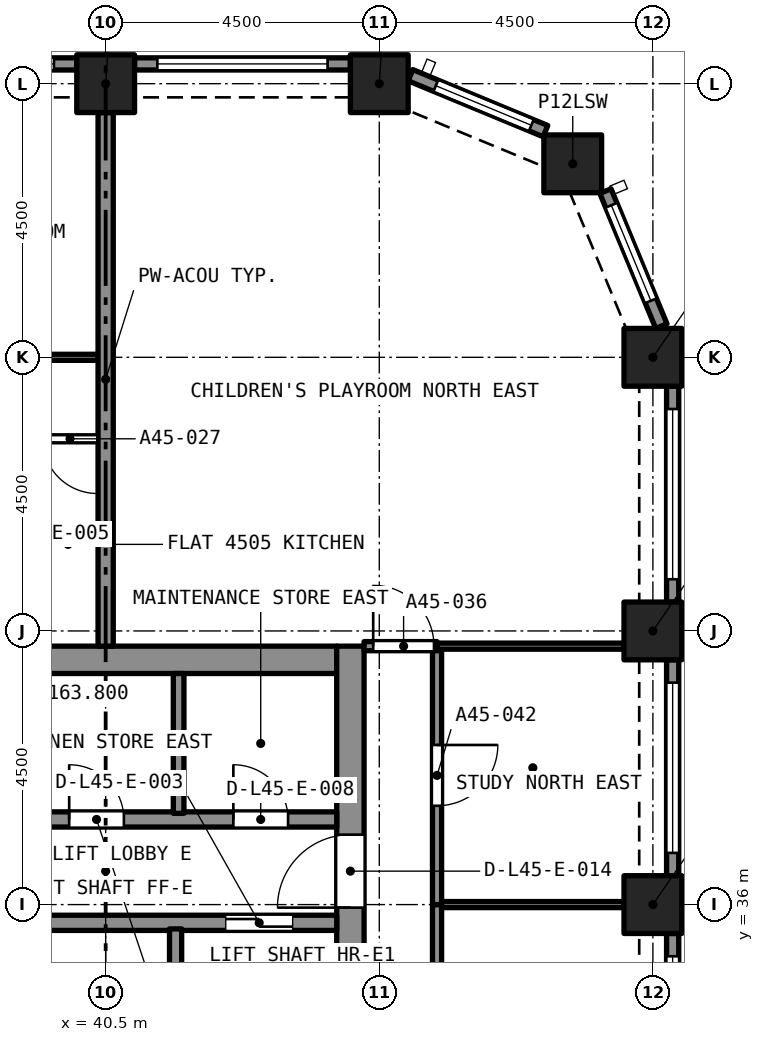
"""IFC4 building model, lengths in metres.
Left out: names, types, materials, properties, quantities, classifications, styles, units other than length and angle.
Written with IfcOpenShell. Run it as: python <this file> out.ifc"""

import sys

from ifc_helpers import new_model, si_unit, direction, frame, frame_2d, origin, origin_2d, place, context, subcontext, project, spatial, rectangle, extrude, element, fill, save


model = new_model("IFC4")
c1 = context("Model", 3, precision=1e-05, world=origin(), true_north=direction((0.0, 1.0)))
c2 = subcontext(c1, "Body", "Model", "MODEL_VIEW")
j1 = project(units=[si_unit("LENGTHUNIT", "METRE"), si_unit("PLANEANGLEUNIT", "RADIAN")], contexts=[c1])
p1 = place(None, origin())
s1 = spatial("IfcSite", under=j1, at=p1, CompositionType="ELEMENT")
p2 = place(p1, origin())
s2 = spatial("IfcBuilding", under=s1, at=p2, CompositionType="ELEMENT")
p3 = place(p2, frame((0.0, 0.0, 163.8)))
s3 = spatial("IfcBuildingStorey", under=s2, at=p3, CompositionType="ELEMENT", Elevation=163.8)
for number, where, z_axis, x_axis in (
    (1, (49.5, 36.0, 0.0), (0.0, 0.0, 1.0), (1.0, 0.0, 0.0)),
    (2, (49.5, 40.5, 0.0), (0.0, 0.0, 1.0), (1.0, 0.0, 0.0)),
    (3, (49.5, 45.0, 0.0), (0.0, 0.0, 1.0), (1.0, 0.0, 0.0)),
    (4, (48.182, 48.182, 0.0), (0.0, 0.0, 1.0), (1.0, 0.0, 0.0)),
    (5, (40.5, 49.5, 0.0), (0.0, 0.0, 1.0), (1.0, 0.0, 0.0)),
    (6, (45.0, 49.5, 0.0), (0.0, 0.0, 1.0), (1.0, 0.0, 0.0)),
):
    element("IfcColumn", number, at=place(p3, frame(where, z_axis=z_axis, x_axis=x_axis)), inside=s3, PredefinedType="COLUMN", context=c2, shape_type="SweptSolid", body=[
        extrude(rectangle(XDim=0.95, YDim=0.95, at=origin_2d()), origin(), (0.0, 0.0, 1.0), 4.4),
    ])
p4 = place(p3, frame((36.7, 40.025, 0.0), z_axis=(0.0, 0.0, 1.0), x_axis=(1.0, 0.0, 0.0)))
e7 = element("IfcWall", 7, at=p4, inside=s3, PredefinedType="SOLIDWALL", context=c2, shape_type="SweptSolid", body=[
    extrude(rectangle(XDim=7.6, YDim=0.45, at=frame_2d((3.8, 0.0))), origin(), (0.0, 0.0, 1.0), 4.4),
])
p5 = place(p3, frame((44.525, 27.25, 0.0), z_axis=(0.0, 0.0, 1.0), x_axis=(0.0, 1.0, 0.0)))
e8 = element("IfcWall", 8, at=p5, inside=s3, PredefinedType="SOLIDWALL", context=c2, shape_type="SweptSolid", body=[
    extrude(rectangle(XDim=13.0, YDim=0.45, at=frame_2d((6.5, 0.0))), origin(), (0.0, 0.0, 1.0), 4.4),
])
p6 = place(p5, frame((8.7, 0.0, 0.0)))
e9 = element("IfcOpeningElement", 9, at=p6, cuts=e8, PredefinedType="OPENING", context=c2, shape_type="SweptSolid", body=[
    extrude(rectangle(XDim=1.2, YDim=2.1, at=frame_2d((0.6, 1.05))), frame((0.0, 0.235, 0.0), z_axis=(0.0, -1.0, 0.0), x_axis=(1.0, 0.0, 0.0)), (0.0, 0.0, 1.0), 0.47),
])
p7 = place(p3, frame((49.825, 35.525, 0.0), z_axis=(0.0, 0.0, 1.0), x_axis=(0.0, -1.0, 0.0)))
e10 = element("IfcWall", 10, at=p7, inside=s3, PredefinedType="SOLIDWALL", context=c2, shape_type="SweptSolid", body=[
    extrude(rectangle(XDim=3.55, YDim=0.2, at=frame_2d((1.775, 0.0))), origin(), (0.0, 0.0, 1.0), 4.4),
])
p8 = place(p7, frame((0.375, 0.0, 0.45)))
e11 = element("IfcOpeningElement", 11, at=p8, cuts=e10, PredefinedType="OPENING", context=c2, shape_type="SweptSolid", body=[
    extrude(rectangle(XDim=2.8, YDim=2.55, at=frame_2d((1.4, 1.275))), frame((0.0, 0.11, 0.0), z_axis=(0.0, -1.0, 0.0), x_axis=(1.0, 0.0, 0.0)), (0.0, 0.0, 1.0), 0.22),
])
p9 = place(p3, frame((49.825, 40.025, 0.0), z_axis=(0.0, 0.0, 1.0), x_axis=(0.0, -1.0, 0.0)))
e12 = element("IfcWall", 12, at=p9, inside=s3, PredefinedType="SOLIDWALL", context=c2, shape_type="SweptSolid", body=[
    extrude(rectangle(XDim=3.55, YDim=0.2, at=frame_2d((1.775, 0.0))), origin(), (0.0, 0.0, 1.0), 4.4),
])
p10 = place(p9, frame((0.375, 0.0, 0.45)))
e13 = element("IfcOpeningElement", 13, at=p10, cuts=e12, PredefinedType="OPENING", context=c2, shape_type="SweptSolid", body=[
    extrude(rectangle(XDim=2.8, YDim=2.55, at=frame_2d((1.4, 1.275))), frame((0.0, 0.11, 0.0), z_axis=(0.0, -1.0, 0.0), x_axis=(1.0, 0.0, 0.0)), (0.0, 0.0, 1.0), 0.22),
])
p11 = place(p3, frame((49.825, 44.525, 0.0), z_axis=(0.0, 0.0, 1.0), x_axis=(0.0, -1.0, 0.0)))
e14 = element("IfcWall", 14, at=p11, inside=s3, PredefinedType="SOLIDWALL", context=c2, shape_type="SweptSolid", body=[
    extrude(rectangle(XDim=3.55, YDim=0.2, at=frame_2d((1.775, 0.0))), origin(), (0.0, 0.0, 1.0), 4.4),
])
p12 = place(p11, frame((0.375, 0.0, 0.45)))
e15 = element("IfcOpeningElement", 15, at=p12, cuts=e14, PredefinedType="OPENING", context=c2, shape_type="SweptSolid", body=[
    extrude(rectangle(XDim=2.8, YDim=2.55, at=frame_2d((1.4, 1.275))), frame((0.0, 0.11, 0.0), z_axis=(0.0, -1.0, 0.0), x_axis=(1.0, 0.0, 0.0)), (0.0, 0.0, 1.0), 0.22),
])
p13 = place(p3, frame((48.72, 47.733, 0.0), z_axis=(0.0, 0.0, 1.0), x_axis=(0.382680855588, -0.923880599843, 0.0)))
e16 = element("IfcWall", 16, at=p13, inside=s3, PredefinedType="SOLIDWALL", context=c2, shape_type="SweptSolid", body=[
    extrude(rectangle(XDim=2.403, YDim=0.2, at=frame_2d((1.201, 0.0))), origin(), (0.0, 0.0, 1.0), 4.4),
])
p14 = place(p13, frame((0.251, 0.0, 0.45)))
e17 = element("IfcOpeningElement", 17, at=p14, cuts=e16, PredefinedType="OPENING", context=c2, shape_type="SweptSolid", body=[
    extrude(rectangle(XDim=1.7, YDim=2.55, at=frame_2d((0.85, 1.275))), frame((0.0, 0.11, 0.0), z_axis=(0.0, -1.0, 0.0), x_axis=(1.0, 0.0, 0.0)), (0.0, 0.0, 1.0), 0.22),
])
p15 = place(p3, frame((45.513, 49.639, 0.0), z_axis=(0.0, 0.0, 1.0), x_axis=(0.923880599843, -0.382680855588, 0.0)))
e18 = element("IfcWall", 18, at=p15, inside=s3, PredefinedType="SOLIDWALL", context=c2, shape_type="SweptSolid", body=[
    extrude(rectangle(XDim=2.403, YDim=0.2, at=frame_2d((1.201, 0.0))), origin(), (0.0, 0.0, 1.0), 4.4),
])
p16 = place(p15, frame((0.451, 0.0, 0.45)))
e19 = element("IfcOpeningElement", 19, at=p16, cuts=e18, PredefinedType="OPENING", context=c2, shape_type="SweptSolid", body=[
    extrude(rectangle(XDim=1.7, YDim=2.55, at=frame_2d((0.85, 1.275))), frame((0.0, 0.11, 0.0), z_axis=(0.0, -1.0, 0.0), x_axis=(1.0, 0.0, 0.0)), (0.0, 0.0, 1.0), 0.22),
])
p17 = place(p3, frame((40.975, 49.825, 0.0), z_axis=(0.0, 0.0, 1.0), x_axis=(1.0, 0.0, 0.0)))
e20 = element("IfcWall", 20, at=p17, inside=s3, PredefinedType="SOLIDWALL", context=c2, shape_type="SweptSolid", body=[
    extrude(rectangle(XDim=3.55, YDim=0.2, at=frame_2d((1.775, 0.0))), origin(), (0.0, 0.0, 1.0), 4.4),
])
p18 = place(p17, frame((0.375, 0.0, 0.45)))
e21 = element("IfcOpeningElement", 21, at=p18, cuts=e20, PredefinedType="OPENING", context=c2, shape_type="SweptSolid", body=[
    extrude(rectangle(XDim=2.8, YDim=2.55, at=frame_2d((1.4, 1.275))), frame((0.0, 0.11, 0.0), z_axis=(0.0, -1.0, 0.0), x_axis=(1.0, 0.0, 0.0)), (0.0, 0.0, 1.0), 0.22),
])
p19 = place(p3, frame((36.475, 49.825, 0.0), z_axis=(0.0, 0.0, 1.0), x_axis=(1.0, 0.0, 0.0)))
e22 = element("IfcWall", 22, at=p19, inside=s3, PredefinedType="SOLIDWALL", context=c2, shape_type="SweptSolid", body=[
    extrude(rectangle(XDim=3.55, YDim=0.2, at=frame_2d((1.775, 0.0))), origin(), (0.0, 0.0, 1.0), 4.4),
])
p20 = place(p19, frame((0.375, 0.0, 0.45)))
e23 = element("IfcOpeningElement", 23, at=p20, cuts=e22, PredefinedType="OPENING", context=c2, shape_type="SweptSolid", body=[
    extrude(rectangle(XDim=2.8, YDim=2.55, at=frame_2d((1.4, 1.275))), frame((0.0, 0.11, 0.0), z_axis=(0.0, -1.0, 0.0), x_axis=(1.0, 0.0, 0.0)), (0.0, 0.0, 1.0), 0.22),
])
p21 = place(p3, frame((36.0, 45.0, 0.0), z_axis=(0.0, 0.0, 1.0), x_axis=(1.0, 0.0, 0.0)))
e24 = element("IfcWall", 24, at=p21, inside=s3, PredefinedType="PARTITIONING", context=c2, shape_type="SweptSolid", body=[
    extrude(rectangle(XDim=4.375, YDim=0.1, at=frame_2d((2.188, 0.0))), origin(), (0.0, 0.0, 1.0), 4.1),
])
p22 = place(p21, frame((1.8, 0.0, 0.0)))
e25 = element("IfcOpeningElement", 25, at=p22, cuts=e24, PredefinedType="OPENING", context=c2, shape_type="SweptSolid", body=[
    extrude(rectangle(XDim=0.9, YDim=2.1, at=frame_2d((0.45, 1.05))), frame((0.0, 0.06, 0.0), z_axis=(0.0, -1.0, 0.0), x_axis=(1.0, 0.0, 0.0)), (0.0, 0.0, 1.0), 0.12),
])
p23 = place(p3, frame((40.375, 43.66, 0.0), z_axis=(0.0, 0.0, 1.0), x_axis=(-1.0, 0.0, 0.0)))
e26 = element("IfcWall", 26, at=p23, inside=s3, PredefinedType="PARTITIONING", context=c2, shape_type="SweptSolid", body=[
    extrude(rectangle(XDim=1.048, YDim=0.1, at=frame_2d((0.524, 0.0))), origin(), (0.0, 0.0, 1.0), 4.1),
])
p24 = place(p23, frame((0.011, 0.0, 0.0)))
e27 = element("IfcOpeningElement", 27, at=p24, cuts=e26, PredefinedType="OPENING", context=c2, shape_type="SweptSolid", body=[
    extrude(rectangle(XDim=0.9, YDim=2.1, at=frame_2d((0.45, 1.05))), frame((0.0, 0.06, 0.0), z_axis=(0.0, -1.0, 0.0), x_axis=(1.0, 0.0, 0.0)), (0.0, 0.0, 1.0), 0.12),
])
p25 = place(p3, frame((40.5, 40.25, 0.0), z_axis=(0.0, 0.0, 1.0), x_axis=(0.0, 1.0, 0.0)))
e28 = element("IfcWall", 28, at=p25, inside=s3, PredefinedType="PARTITIONING", context=c2, shape_type="SweptSolid", body=[
    extrude(rectangle(XDim=8.775, YDim=0.25, at=frame_2d((4.387, 0.0))), origin(), (0.0, 0.0, 1.0), 4.1),
])
p26 = place(p3, frame((44.75, 40.25, 0.0), z_axis=(0.0, 0.0, 1.0), x_axis=(1.0, 0.0, 0.0)))
e29 = element("IfcWall", 29, at=p26, inside=s3, PredefinedType="PARTITIONING", context=c2, shape_type="SweptSolid", body=[
    extrude(rectangle(XDim=1.2, YDim=0.15, at=frame_2d((0.6, 0.0))), origin(), (0.0, 0.0, 1.0), 4.1),
])
p27 = place(p26, frame((0.15, 0.0, 0.0)))
e30 = element("IfcOpeningElement", 30, at=p27, cuts=e29, PredefinedType="OPENING", context=c2, shape_type="SweptSolid", body=[
    extrude(rectangle(XDim=1.0, YDim=2.1, at=frame_2d((0.5, 1.05))), frame((0.0, 0.085, 0.0), z_axis=(0.0, -1.0, 0.0), x_axis=(1.0, 0.0, 0.0)), (0.0, 0.0, 1.0), 0.17),
])
p28 = place(p3, frame((45.95, 40.25, 0.0), z_axis=(0.0, 0.0, 1.0), x_axis=(1.0, 0.0, 0.0)))
e31 = element("IfcWall", 31, at=p28, inside=s3, PredefinedType="PARTITIONING", context=c2, shape_type="SweptSolid", body=[
    extrude(rectangle(XDim=3.075, YDim=0.1, at=frame_2d((1.538, 0.0))), origin(), (0.0, 0.0, 1.0), 4.1),
])
p29 = place(p3, frame((45.95, 36.0, 0.0), z_axis=(0.0, 0.0, 1.0), x_axis=(0.0, -1.0, 0.0)))
e32 = element("IfcWall", 32, at=p29, inside=s3, PredefinedType="PARTITIONING", context=c2, shape_type="SweptSolid", body=[
    extrude(rectangle(XDim=4.5, YDim=0.15, at=frame_2d((2.25, 0.0))), origin(), (0.0, 0.0, 1.0), 4.1),
])
p30 = place(p29, frame((1.75, 0.0, 0.0)))
e33 = element("IfcOpeningElement", 33, at=p30, cuts=e32, PredefinedType="OPENING", context=c2, shape_type="SweptSolid", body=[
    extrude(rectangle(XDim=1.0, YDim=2.1, at=frame_2d((0.5, 1.05))), frame((0.0, 0.085, 0.0), z_axis=(0.0, -1.0, 0.0), x_axis=(1.0, 0.0, 0.0)), (0.0, 0.0, 1.0), 0.17),
])
p31 = place(p3, frame((45.95, 40.175, 0.0), z_axis=(0.0, 0.0, 1.0), x_axis=(0.0, -1.0, 0.0)))
e34 = element("IfcWall", 34, at=p31, inside=s3, PredefinedType="PARTITIONING", context=c2, shape_type="SweptSolid", body=[
    extrude(rectangle(XDim=4.175, YDim=0.15, at=frame_2d((2.087, 0.0))), origin(), (0.0, 0.0, 1.0), 4.1),
])
p32 = place(p31, frame((1.55, 0.0, 0.0)))
e35 = element("IfcOpeningElement", 35, at=p32, cuts=e34, PredefinedType="OPENING", context=c2, shape_type="SweptSolid", body=[
    extrude(rectangle(XDim=1.0, YDim=2.1, at=frame_2d((0.5, 1.05))), frame((0.0, 0.085, 0.0), z_axis=(0.0, -1.0, 0.0), x_axis=(1.0, 0.0, 0.0)), (0.0, 0.0, 1.0), 0.17),
])
p33 = place(p3, frame((46.025, 36.0, 0.0), z_axis=(0.0, 0.0, 1.0), x_axis=(1.0, 0.0, 0.0)))
e36 = element("IfcWall", 36, at=p33, inside=s3, PredefinedType="PARTITIONING", context=c2, shape_type="SweptSolid", body=[
    extrude(rectangle(XDim=3.0, YDim=0.1, at=frame_2d((1.5, 0.0))), origin(), (0.0, 0.0, 1.0), 4.1),
])
p34 = place(p3, frame((36.7, 35.7, 0.0), z_axis=(0.0, 0.0, 1.0), x_axis=(1.0, 0.0, 0.0)))
e37 = element("IfcWall", 37, at=p34, inside=s3, PredefinedType="SOLIDWALL", context=c2, shape_type="SweptSolid", body=[
    extrude(rectangle(XDim=7.6, YDim=0.25, at=frame_2d((3.8, 0.0))), origin(), (0.0, 0.0, 1.0), 4.1),
])
p35 = place(p34, frame((5.775, 0.0, 0.0)))
e38 = element("IfcOpeningElement", 38, at=p35, cuts=e37, PredefinedType="OPENING", context=c2, shape_type="SweptSolid", body=[
    extrude(rectangle(XDim=1.1, YDim=2.4, at=frame_2d((0.55, 1.2))), frame((0.0, 0.135, 0.0), z_axis=(0.0, -1.0, 0.0), x_axis=(1.0, 0.0, 0.0)), (0.0, 0.0, 1.0), 0.27),
])
p36 = place(p34, frame((1.512, 0.0, 0.0)))
e39 = element("IfcOpeningElement", 39, at=p36, cuts=e37, PredefinedType="OPENING", context=c2, shape_type="SweptSolid", body=[
    extrude(rectangle(XDim=0.9, YDim=2.1, at=frame_2d((0.45, 1.05))), frame((0.0, 0.135, 0.0), z_axis=(0.0, -1.0, 0.0), x_axis=(1.0, 0.0, 0.0)), (0.0, 0.0, 1.0), 0.27),
])
p37 = place(p34, frame((0.137, 0.0, 0.0)))
e40 = element("IfcOpeningElement", 40, at=p37, cuts=e37, PredefinedType="OPENING", context=c2, shape_type="SweptSolid", body=[
    extrude(rectangle(XDim=0.9, YDim=2.1, at=frame_2d((0.45, 1.05))), frame((0.0, 0.135, 0.0), z_axis=(0.0, -1.0, 0.0), x_axis=(1.0, 0.0, 0.0)), (0.0, 0.0, 1.0), 0.27),
])
p38 = place(p3, frame((36.7, 37.4, 0.0), z_axis=(0.0, 0.0, 1.0), x_axis=(1.0, 0.0, 0.0)))
e41 = element("IfcWall", 41, at=p38, inside=s3, PredefinedType="SOLIDWALL", context=c2, shape_type="SweptSolid", body=[
    extrude(rectangle(XDim=7.6, YDim=0.25, at=frame_2d((3.8, 0.0))), origin(), (0.0, 0.0, 1.0), 4.1),
])
p39 = place(p38, frame((0.75, 0.0, 0.0)))
e42 = element("IfcOpeningElement", 42, at=p39, cuts=e41, PredefinedType="OPENING", context=c2, shape_type="SweptSolid", body=[
    extrude(rectangle(XDim=0.7, YDim=2.1, at=frame_2d((0.35, 1.05))), frame((0.0, 0.135, 0.0), z_axis=(0.0, -1.0, 0.0), x_axis=(1.0, 0.0, 0.0)), (0.0, 0.0, 1.0), 0.27),
])
p40 = place(p38, frame((5.9, 0.0, 0.0)))
e43 = element("IfcOpeningElement", 43, at=p40, cuts=e41, PredefinedType="OPENING", context=c2, shape_type="SweptSolid", body=[
    extrude(rectangle(XDim=0.9, YDim=2.1, at=frame_2d((0.45, 1.05))), frame((0.0, 0.135, 0.0), z_axis=(0.0, -1.0, 0.0), x_axis=(1.0, 0.0, 0.0)), (0.0, 0.0, 1.0), 0.27),
])
p41 = place(p38, frame((3.2, 0.0, 0.0)))
e44 = element("IfcOpeningElement", 44, at=p41, cuts=e41, PredefinedType="OPENING", context=c2, shape_type="SweptSolid", body=[
    extrude(rectangle(XDim=0.9, YDim=2.1, at=frame_2d((0.45, 1.05))), frame((0.0, 0.135, 0.0), z_axis=(0.0, -1.0, 0.0), x_axis=(1.0, 0.0, 0.0)), (0.0, 0.0, 1.0), 0.27),
])
p42 = place(p3, frame((41.65, 33.3, 0.0), z_axis=(0.0, 0.0, 1.0), x_axis=(0.0, 1.0, 0.0)))
e45 = element("IfcWall", 45, at=p42, inside=s3, PredefinedType="SOLIDWALL", context=c2, shape_type="SweptSolid", body=[
    extrude(rectangle(XDim=2.3, YDim=0.2, at=frame_2d((1.15, 0.0))), origin(), (0.0, 0.0, 1.0), 4.1),
])
p43 = place(p3, frame((41.7, 37.5, 0.0), z_axis=(0.0, 0.0, 1.0), x_axis=(0.0, 1.0, 0.0)))
e46 = element("IfcWall", 46, at=p43, inside=s3, PredefinedType="SOLIDWALL", context=c2, shape_type="SweptSolid", body=[
    extrude(rectangle(XDim=2.3, YDim=0.175, at=frame_2d((1.15, 0.0))), origin(), (0.0, 0.0, 1.0), 4.1),
])
p44 = place(p8, origin())
e47 = element("IfcWindow", 47, at=p44, inside=s3, PartitioningType="SINGLE_PANEL", PredefinedType="WINDOW", context=c2, shape_type="SweptSolid", body=[
    extrude(rectangle(XDim=2.8, YDim=2.55, at=frame_2d((1.4, 1.275))), frame((0.0, 0.03, 0.0), z_axis=(0.0, -1.0, 0.0), x_axis=(1.0, 0.0, 0.0)), (0.0, 0.0, 1.0), 0.06),
])
fill(e11, e47)
p45 = place(p10, origin())
e48 = element("IfcWindow", 48, at=p45, inside=s3, PartitioningType="SINGLE_PANEL", PredefinedType="WINDOW", context=c2, shape_type="SweptSolid", body=[
    extrude(rectangle(XDim=2.8, YDim=2.55, at=frame_2d((1.4, 1.275))), frame((0.0, 0.03, 0.0), z_axis=(0.0, -1.0, 0.0), x_axis=(1.0, 0.0, 0.0)), (0.0, 0.0, 1.0), 0.06),
])
fill(e13, e48)
p46 = place(p12, origin())
e49 = element("IfcWindow", 49, at=p46, inside=s3, PartitioningType="SINGLE_PANEL", PredefinedType="WINDOW", context=c2, shape_type="SweptSolid", body=[
    extrude(rectangle(XDim=2.8, YDim=2.55, at=frame_2d((1.4, 1.275))), frame((0.0, 0.03, 0.0), z_axis=(0.0, -1.0, 0.0), x_axis=(1.0, 0.0, 0.0)), (0.0, 0.0, 1.0), 0.06),
])
fill(e15, e49)
p47 = place(p14, origin())
e50 = element("IfcWindow", 50, at=p47, inside=s3, PartitioningType="SINGLE_PANEL", PredefinedType="WINDOW", context=c2, shape_type="SweptSolid", body=[
    extrude(rectangle(XDim=1.7, YDim=2.55, at=frame_2d((0.85, 1.275))), frame((0.0, 0.03, 0.0), z_axis=(0.0, -1.0, 0.0), x_axis=(1.0, 0.0, 0.0)), (0.0, 0.0, 1.0), 0.06),
])
fill(e17, e50)
p48 = place(p16, origin())
e51 = element("IfcWindow", 51, at=p48, inside=s3, PartitioningType="SINGLE_PANEL", PredefinedType="WINDOW", context=c2, shape_type="SweptSolid", body=[
    extrude(rectangle(XDim=1.7, YDim=2.55, at=frame_2d((0.85, 1.275))), frame((0.0, 0.03, 0.0), z_axis=(0.0, -1.0, 0.0), x_axis=(1.0, 0.0, 0.0)), (0.0, 0.0, 1.0), 0.06),
])
fill(e19, e51)
p49 = place(p18, origin())
e52 = element("IfcWindow", 52, at=p49, inside=s3, PartitioningType="SINGLE_PANEL", PredefinedType="WINDOW", context=c2, shape_type="SweptSolid", body=[
    extrude(rectangle(XDim=2.8, YDim=2.55, at=frame_2d((1.4, 1.275))), frame((0.0, 0.03, 0.0), z_axis=(0.0, -1.0, 0.0), x_axis=(1.0, 0.0, 0.0)), (0.0, 0.0, 1.0), 0.06),
])
fill(e21, e52)
p50 = place(p20, origin())
e53 = element("IfcWindow", 53, at=p50, inside=s3, PartitioningType="SINGLE_PANEL", PredefinedType="WINDOW", context=c2, shape_type="SweptSolid", body=[
    extrude(rectangle(XDim=2.8, YDim=2.55, at=frame_2d((1.4, 1.275))), frame((0.0, 0.03, 0.0), z_axis=(0.0, -1.0, 0.0), x_axis=(1.0, 0.0, 0.0)), (0.0, 0.0, 1.0), 0.06),
])
fill(e23, e53)
p51 = place(p24, origin())
e54 = element("IfcDoor", 54, at=p51, inside=s3, OperationType="SINGLE_SWING_LEFT", PredefinedType="DOOR", context=c2, shape_type="SweptSolid", body=[
    extrude(rectangle(XDim=0.9, YDim=2.1, at=frame_2d((0.45, 1.05))), frame((0.0, 0.025, 0.0), z_axis=(0.0, -1.0, 0.0), x_axis=(1.0, 0.0, 0.0)), (0.0, 0.0, 1.0), 0.05),
])
fill(e27, e54)
p52 = place(p27, origin())
e55 = element("IfcDoor", 55, at=p52, inside=s3, OperationType="SINGLE_SWING_RIGHT", PredefinedType="DOOR", context=c2, shape_type="SweptSolid", body=[
    extrude(rectangle(XDim=1.0, YDim=2.1, at=frame_2d((0.5, 1.05))), frame((0.0, 0.025, 0.0), z_axis=(0.0, -1.0, 0.0), x_axis=(1.0, 0.0, 0.0)), (0.0, 0.0, 1.0), 0.05),
])
fill(e30, e55)
p53 = place(p32, origin())
e56 = element("IfcDoor", 56, at=p53, inside=s3, OperationType="SINGLE_SWING_LEFT", PredefinedType="DOOR", context=c2, shape_type="SweptSolid", body=[
    extrude(rectangle(XDim=1.0, YDim=2.1, at=frame_2d((0.5, 1.05))), frame((0.0, 0.025, 0.0), z_axis=(0.0, -1.0, 0.0), x_axis=(1.0, 0.0, 0.0)), (0.0, 0.0, 1.0), 0.05),
])
fill(e35, e56)
p54 = place(p35, origin())
e57 = element("IfcDoor", 57, at=p54, inside=s3, OperationType="SLIDING_TO_LEFT", PredefinedType="DOOR", context=c2, shape_type="SweptSolid", body=[
    extrude(rectangle(XDim=1.1, YDim=2.4, at=frame_2d((0.55, 1.2))), frame((0.0, 0.025, 0.0), z_axis=(0.0, -1.0, 0.0), x_axis=(1.0, 0.0, 0.0)), (0.0, 0.0, 1.0), 0.05),
])
fill(e38, e57)
p55 = place(p40, origin())
e58 = element("IfcDoor", 58, at=p55, inside=s3, OperationType="SINGLE_SWING_LEFT", PredefinedType="DOOR", context=c2, shape_type="SweptSolid", body=[
    extrude(rectangle(XDim=0.9, YDim=2.1, at=frame_2d((0.45, 1.05))), frame((0.0, 0.025, 0.0), z_axis=(0.0, -1.0, 0.0), x_axis=(1.0, 0.0, 0.0)), (0.0, 0.0, 1.0), 0.05),
])
fill(e43, e58)
p56 = place(p41, origin())
e59 = element("IfcDoor", 59, at=p56, inside=s3, OperationType="SINGLE_SWING_LEFT", PredefinedType="DOOR", context=c2, shape_type="SweptSolid", body=[
    extrude(rectangle(XDim=0.9, YDim=2.1, at=frame_2d((0.45, 1.05))), frame((0.0, 0.025, 0.0), z_axis=(0.0, -1.0, 0.0), x_axis=(1.0, 0.0, 0.0)), (0.0, 0.0, 1.0), 0.05),
])
fill(e44, e59)
p57 = place(p6, origin())
e60 = element("IfcDoor", 60, at=p57, inside=s3, OperationType="SINGLE_SWING_LEFT", PredefinedType="DOOR", context=c2, shape_type="SweptSolid", body=[
    extrude(rectangle(XDim=1.2, YDim=2.1, at=frame_2d((0.6, 1.05))), frame((0.0, 0.025, 0.0), z_axis=(0.0, -1.0, 0.0), x_axis=(1.0, 0.0, 0.0)), (0.0, 0.0, 1.0), 0.05),
])
fill(e9, e60)
save(model, sys.argv[1])
